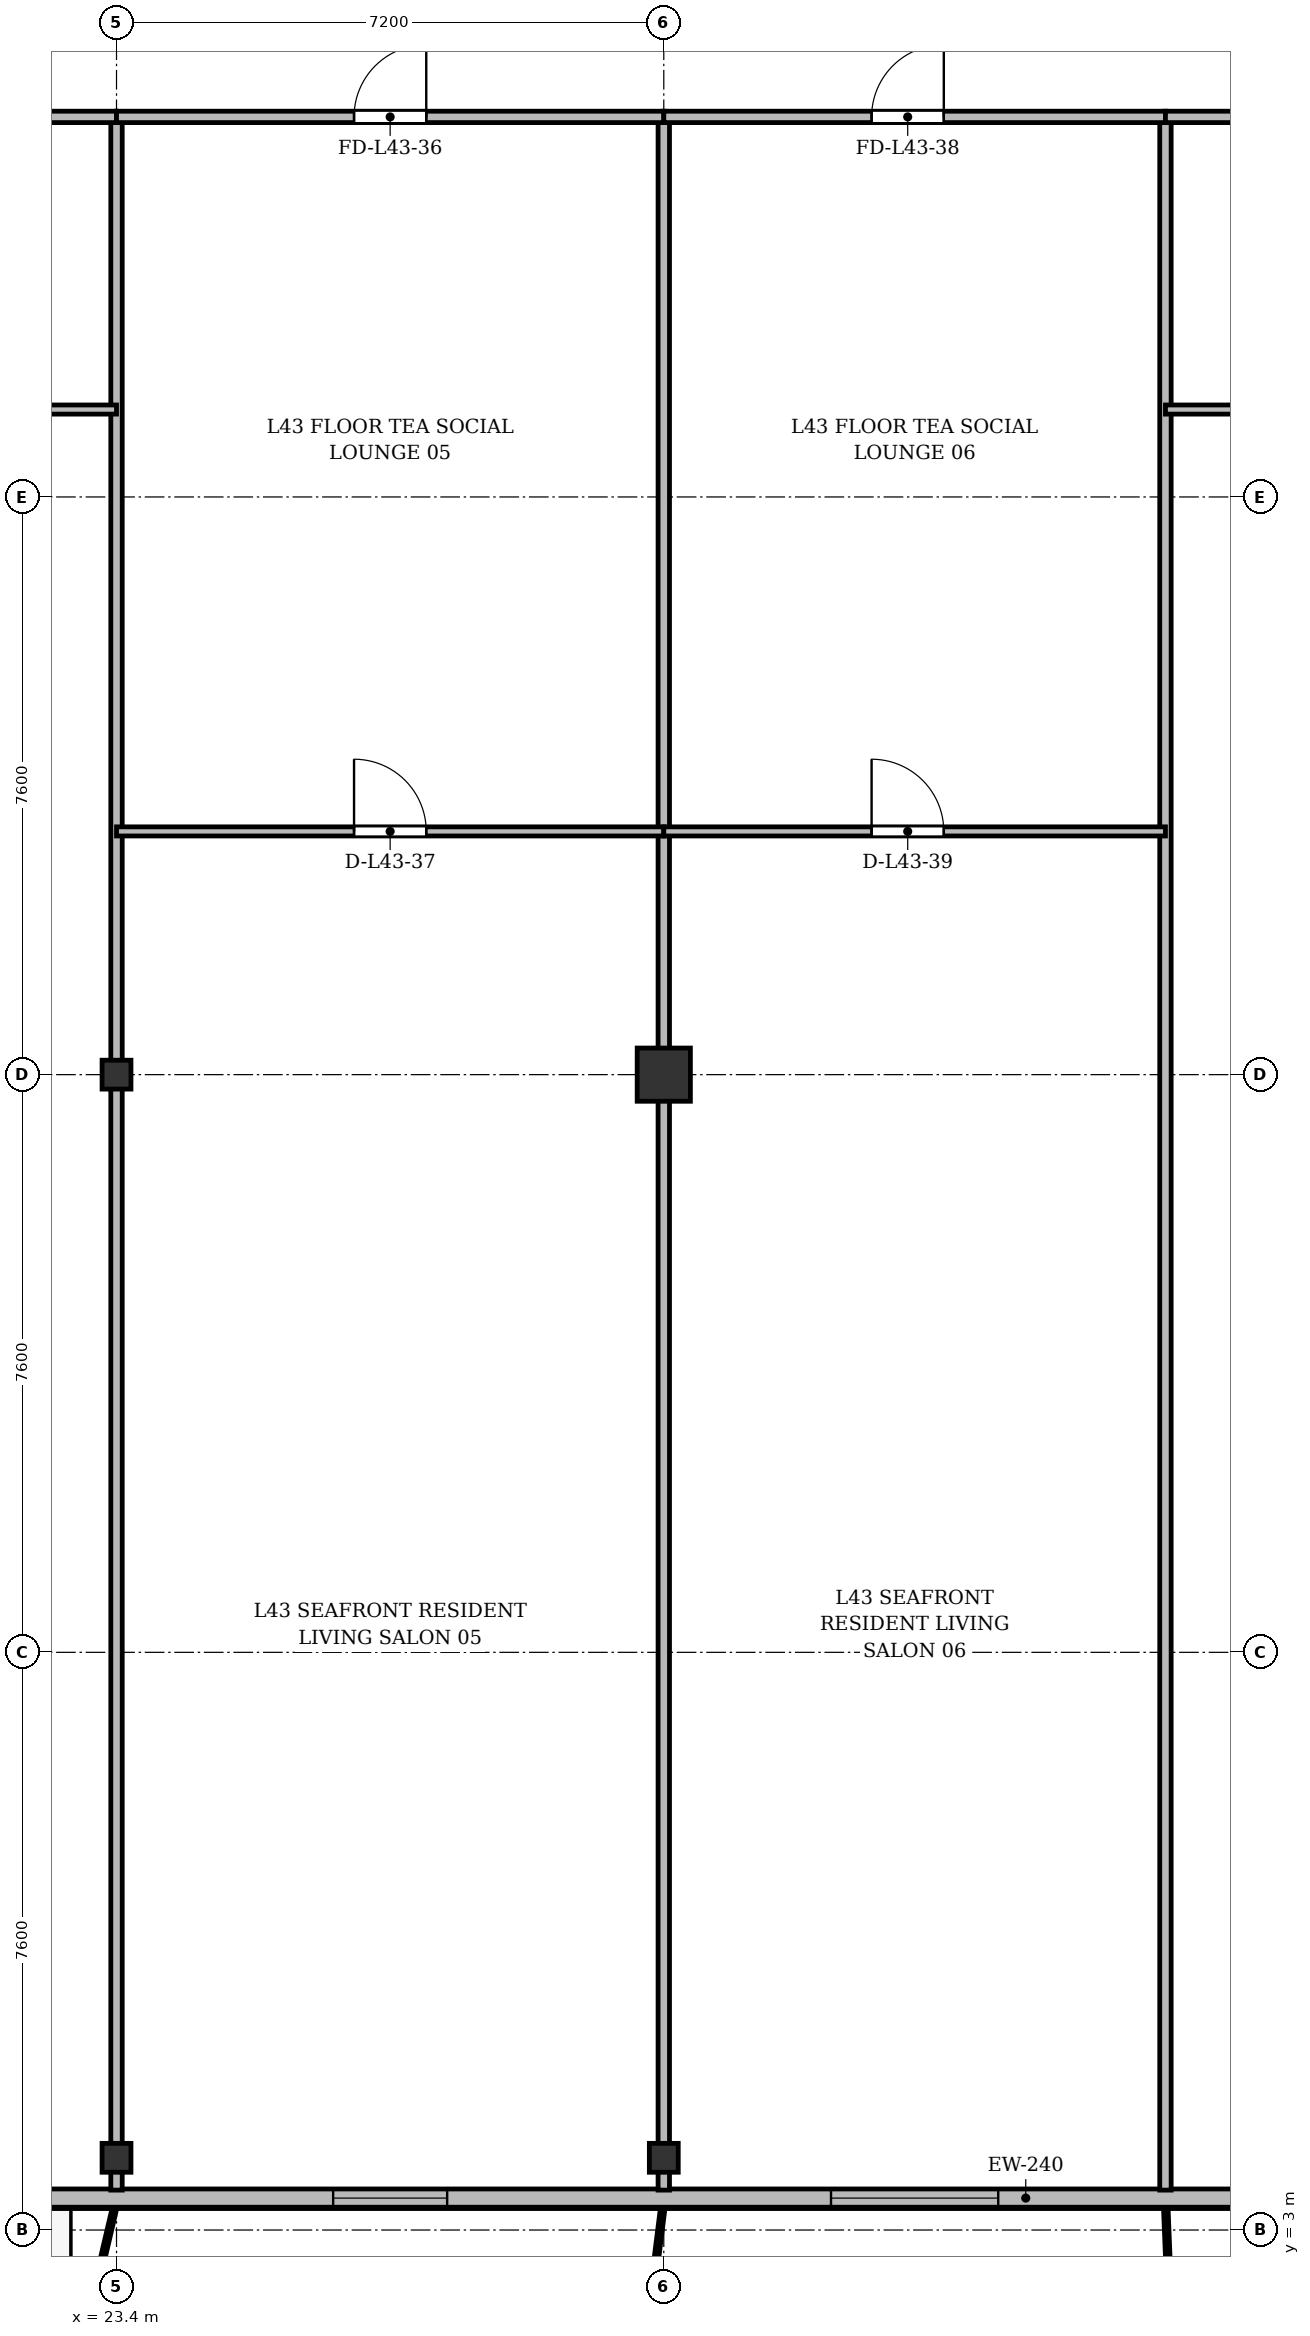
"""IFC4 building model, lengths in metres.
Left out: names, types, materials, properties, quantities, classifications, styles, units other than length and angle.
Written with IfcOpenShell. Run it as: python <this file> out.ifc"""

import sys

from ifc_helpers import new_model, si_unit, direction, frame, frame_2d, origin, origin_2d, place, context, subcontext, project, spatial, rectangle, i_section, extrude, source, transform, mapped, element, fill, save


model = new_model("IFC4")
c1 = context("Model", 3, precision=1e-05, world=origin(), true_north=direction((0.0, 1.0)))
c2 = subcontext(c1, "Body", "Model", "MODEL_VIEW")
j1 = project(units=[si_unit("LENGTHUNIT", "METRE"), si_unit("PLANEANGLEUNIT", "RADIAN")], contexts=[c1])
p1 = place(None, origin())
s1 = spatial("IfcSite", under=j1, at=p1, CompositionType="ELEMENT")
p2 = place(p1, origin())
s2 = spatial("IfcBuilding", under=s1, at=p2, CompositionType="ELEMENT")
p3 = place(p2, frame((0.0, 0.0, 164.5)))
s3 = spatial("IfcBuildingStorey", under=s2, at=p3, CompositionType="ELEMENT", Elevation=164.5)
m1 = source(origin(), c2, "Body", "SweptSolid", [
    extrude(i_section(OverallWidth=0.38, OverallDepth=0.38, WebThickness=0.02, FlangeThickness=0.03, at=origin_2d()), origin(), (0.0, 0.0, 1.0), 3.6),
])
for number, where, z_axis, x_axis in (
    (1, (23.4, 3.95, 0.0), (0.0, 0.0, 1.0), (1.0, 0.0, 0.0)),
    (2, (23.4, 18.2, 0.0), (0.0, 0.0, 1.0), (1.0, 0.0, 0.0)),
    (3, (30.6, 3.95, 0.0), (0.0, 0.0, 1.0), (1.0, 0.0, 0.0)),
):
    element("IfcColumn", number, at=place(p3, frame(where, z_axis=z_axis, x_axis=x_axis)), inside=s3, PredefinedType="COLUMN", context=c2, shape_type="MappedRepresentation", body=[
        mapped(m1, transform((0.0, 0.0, 0.0), x_axis=(1.0, 0.0, 0.0), y_axis=(0.0, 1.0, 0.0), z_axis=(0.0, 0.0, 1.0), scale=1.0)),
    ])
m2 = source(origin(), c2, "Body", "SweptSolid", [
    extrude(rectangle(XDim=0.7, YDim=0.7, at=origin_2d()), origin(), (0.0, 0.0, 1.0), 3.6),
])
p4 = place(p3, frame((30.6, 18.2, 0.0), z_axis=(0.0, 0.0, 1.0), x_axis=(1.0, 0.0, 0.0)))
e4 = element("IfcColumn", 4, at=p4, inside=s3, PredefinedType="COLUMN", context=c2, shape_type="MappedRepresentation", body=[
    mapped(m2, transform((0.0, 0.0, 0.0), x_axis=(1.0, 0.0, 0.0), y_axis=(0.0, 1.0, 0.0), z_axis=(0.0, 0.0, 1.0), scale=1.0)),
])
p5 = place(p3, frame((63.6, 3.42, 0.0), z_axis=(0.0, 0.0, 1.0), x_axis=(-1.0, 0.0, 0.0)))
e5 = element("IfcWall", 5, at=p5, inside=s3, PredefinedType="SOLIDWALL", context=c2, shape_type="SweptSolid", body=[
    extrude(rectangle(XDim=52.8, YDim=0.24, at=frame_2d((26.4, 0.0))), origin(), (0.0, 0.0, 1.0), 3.35),
])
p6 = place(p5, frame((1.445, 0.0, 0.9)))
e6 = element("IfcOpeningElement", 6, at=p6, cuts=e5, PredefinedType="OPENING", context=c2, shape_type="SweptSolid", body=[
    extrude(rectangle(XDim=2.0, YDim=1.95, at=frame_2d((1.0, 0.975))), frame((0.0, 0.13, 0.0), z_axis=(0.0, -1.0, 0.0), x_axis=(1.0, 0.0, 0.0)), (0.0, 0.0, 1.0), 0.26),
])
p7 = place(p5, frame((5.275, 0.0, 0.9)))
e7 = element("IfcOpeningElement", 7, at=p7, cuts=e5, PredefinedType="OPENING", context=c2, shape_type="SweptSolid", body=[
    extrude(rectangle(XDim=1.65, YDim=1.85, at=frame_2d((0.825, 0.925))), frame((0.0, 0.13, 0.0), z_axis=(0.0, -1.0, 0.0), x_axis=(1.0, 0.0, 0.0)), (0.0, 0.0, 1.0), 0.26),
])
p8 = place(p5, frame((7.65, 0.0, 0.9)))
e8 = element("IfcOpeningElement", 8, at=p8, cuts=e5, PredefinedType="OPENING", context=c2, shape_type="SweptSolid", body=[
    extrude(rectangle(XDim=1.5, YDim=1.75, at=frame_2d((0.75, 0.875))), frame((0.0, 0.13, 0.0), z_axis=(0.0, -1.0, 0.0), x_axis=(1.0, 0.0, 0.0)), (0.0, 0.0, 1.0), 0.26),
])
p9 = place(p5, frame((9.9, 0.0, 0.9)))
e9 = element("IfcOpeningElement", 9, at=p9, cuts=e5, PredefinedType="OPENING", context=c2, shape_type="SweptSolid", body=[
    extrude(rectangle(XDim=2.2, YDim=1.8, at=frame_2d((1.1, 0.9))), frame((0.0, 0.13, 0.0), z_axis=(0.0, -1.0, 0.0), x_axis=(1.0, 0.0, 0.0)), (0.0, 0.0, 1.0), 0.26),
])
p10 = place(p5, frame((13.62, 0.0, 0.0)))
e10 = element("IfcOpeningElement", 10, at=p10, cuts=e5, PredefinedType="OPENING", context=c2, shape_type="SweptSolid", body=[
    extrude(rectangle(XDim=1.2, YDim=2.2, at=frame_2d((0.6, 1.1))), frame((0.0, 0.13, 0.0), z_axis=(0.0, -1.0, 0.0), x_axis=(1.0, 0.0, 0.0)), (0.0, 0.0, 1.0), 0.26),
])
p11 = place(p5, frame((15.45, 0.0, 0.9)))
e11 = element("IfcOpeningElement", 11, at=p11, cuts=e5, PredefinedType="OPENING", context=c2, shape_type="SweptSolid", body=[
    extrude(rectangle(XDim=1.5, YDim=1.75, at=frame_2d((0.75, 0.875))), frame((0.0, 0.13, 0.0), z_axis=(0.0, -1.0, 0.0), x_axis=(1.0, 0.0, 0.0)), (0.0, 0.0, 1.0), 0.26),
])
p12 = place(p5, frame((17.775, 0.0, 0.9)))
e12 = element("IfcOpeningElement", 12, at=p12, cuts=e5, PredefinedType="OPENING", context=c2, shape_type="SweptSolid", body=[
    extrude(rectangle(XDim=1.65, YDim=1.85, at=frame_2d((0.825, 0.925))), frame((0.0, 0.13, 0.0), z_axis=(0.0, -1.0, 0.0), x_axis=(1.0, 0.0, 0.0)), (0.0, 0.0, 1.0), 0.26),
])
p13 = place(p5, frame((22.2, 0.0, 0.9)))
e13 = element("IfcOpeningElement", 13, at=p13, cuts=e5, PredefinedType="OPENING", context=c2, shape_type="SweptSolid", body=[
    extrude(rectangle(XDim=1.8, YDim=1.8, at=frame_2d((0.9, 0.9))), frame((0.0, 0.13, 0.0), z_axis=(0.0, -1.0, 0.0), x_axis=(1.0, 0.0, 0.0)), (0.0, 0.0, 1.0), 0.26),
])
p14 = place(p5, frame((28.6, 0.0, 0.9)))
e14 = element("IfcOpeningElement", 14, at=p14, cuts=e5, PredefinedType="OPENING", context=c2, shape_type="SweptSolid", body=[
    extrude(rectangle(XDim=2.2, YDim=1.8, at=frame_2d((1.1, 0.9))), frame((0.0, 0.13, 0.0), z_axis=(0.0, -1.0, 0.0), x_axis=(1.0, 0.0, 0.0)), (0.0, 0.0, 1.0), 0.26),
])
p15 = place(p5, frame((35.85, 0.0, 0.9)))
e15 = element("IfcOpeningElement", 15, at=p15, cuts=e5, PredefinedType="OPENING", context=c2, shape_type="SweptSolid", body=[
    extrude(rectangle(XDim=1.5, YDim=1.75, at=frame_2d((0.75, 0.875))), frame((0.0, 0.13, 0.0), z_axis=(0.0, -1.0, 0.0), x_axis=(1.0, 0.0, 0.0)), (0.0, 0.0, 1.0), 0.26),
])
p16 = place(p5, frame((41.656, 0.0, 0.0)))
e16 = element("IfcOpeningElement", 16, at=p16, cuts=e5, PredefinedType="OPENING", context=c2, shape_type="SweptSolid", body=[
    extrude(rectangle(XDim=1.2, YDim=2.2, at=frame_2d((0.6, 1.1))), frame((0.0, 0.13, 0.0), z_axis=(0.0, -1.0, 0.0), x_axis=(1.0, 0.0, 0.0)), (0.0, 0.0, 1.0), 0.26),
])
p17 = place(p5, frame((43.65, 0.0, 0.9)))
e17 = element("IfcOpeningElement", 17, at=p17, cuts=e5, PredefinedType="OPENING", context=c2, shape_type="SweptSolid", body=[
    extrude(rectangle(XDim=1.5, YDim=1.75, at=frame_2d((0.75, 0.875))), frame((0.0, 0.13, 0.0), z_axis=(0.0, -1.0, 0.0), x_axis=(1.0, 0.0, 0.0)), (0.0, 0.0, 1.0), 0.26),
])
p18 = place(p5, frame((45.8, 0.0, 0.9)))
e18 = element("IfcOpeningElement", 18, at=p18, cuts=e5, PredefinedType="OPENING", context=c2, shape_type="SweptSolid", body=[
    extrude(rectangle(XDim=1.8, YDim=1.8, at=frame_2d((0.9, 0.9))), frame((0.0, 0.13, 0.0), z_axis=(0.0, -1.0, 0.0), x_axis=(1.0, 0.0, 0.0)), (0.0, 0.0, 1.0), 0.26),
])
p19 = place(p5, frame((49.255, 0.0, 0.9)))
e19 = element("IfcOpeningElement", 19, at=p19, cuts=e5, PredefinedType="OPENING", context=c2, shape_type="SweptSolid", body=[
    extrude(rectangle(XDim=2.2, YDim=1.8, at=frame_2d((1.1, 0.9))), frame((0.0, 0.13, 0.0), z_axis=(0.0, -1.0, 0.0), x_axis=(1.0, 0.0, 0.0)), (0.0, 0.0, 1.0), 0.26),
])
for number, where, z_axis, x_axis in (
    (20, (23.4, 3.525, 0.0), (0.0, 0.0, 1.0), (0.0, 1.0, 0.0)),
    (21, (30.6, 3.525, 0.0), (0.0, 0.0, 1.0), (0.0, 1.0, 0.0)),
):
    element("IfcWall", number, at=place(p3, frame(where, z_axis=z_axis, x_axis=x_axis)), inside=s3, PredefinedType="PARTITIONING", context=c2, shape_type="SweptSolid", body=[
        extrude(rectangle(XDim=27.275, YDim=0.15, at=frame_2d((13.638, 0.0))), origin(), (0.0, 0.0, 1.0), 2.85),
    ])
p20 = place(p3, frame((37.2, 3.525, 0.0), z_axis=(0.0, 0.0, 1.0), x_axis=(0.0, 1.0, 0.0)))
e22 = element("IfcWall", 22, at=p20, inside=s3, PredefinedType="PARTITIONING", context=c2, shape_type="SweptSolid", body=[
    extrude(rectangle(XDim=27.275, YDim=0.15, at=frame_2d((13.638, 0.0))), origin(), (0.0, 0.0, 1.0), 2.75),
])
p21 = place(p3, frame((20.2, 30.8, 0.0), z_axis=(0.0, 0.0, 1.0), x_axis=(1.0, 0.0, 0.0)))
e23 = element("IfcWall", 23, at=p21, inside=s3, PredefinedType="PARTITIONING", context=c2, shape_type="SweptSolid", body=[
    extrude(rectangle(XDim=3.2, YDim=0.15, at=frame_2d((1.6, 0.0))), origin(), (0.0, 0.0, 1.0), 2.85),
])
p22 = place(p21, frame((1.125, 0.0, 0.0)))
e24 = element("IfcOpeningElement", 24, at=p22, cuts=e23, PredefinedType="OPENING", context=c2, shape_type="SweptSolid", body=[
    extrude(rectangle(XDim=0.95, YDim=2.15, at=frame_2d((0.475, 1.075))), frame((0.0, 0.085, 0.0), z_axis=(0.0, -1.0, 0.0), x_axis=(1.0, 0.0, 0.0)), (0.0, 0.0, 1.0), 0.17),
])
p23 = place(p3, frame((20.2, 26.95, 0.0), z_axis=(0.0, 0.0, 1.0), x_axis=(1.0, 0.0, 0.0)))
e25 = element("IfcWall", 25, at=p23, inside=s3, PredefinedType="PARTITIONING", context=c2, shape_type="SweptSolid", body=[
    extrude(rectangle(XDim=3.2, YDim=0.12, at=frame_2d((1.6, 0.0))), origin(), (0.0, 0.0, 1.0), 2.85),
])
p24 = place(p23, frame((1.125, 0.0, 0.0)))
e26 = element("IfcOpeningElement", 26, at=p24, cuts=e25, PredefinedType="OPENING", context=c2, shape_type="SweptSolid", body=[
    extrude(rectangle(XDim=0.95, YDim=2.15, at=frame_2d((0.475, 1.075))), frame((0.0, 0.07, 0.0), z_axis=(0.0, -1.0, 0.0), x_axis=(1.0, 0.0, 0.0)), (0.0, 0.0, 1.0), 0.14),
])
p25 = place(p3, frame((23.4, 30.8, 0.0), z_axis=(0.0, 0.0, 1.0), x_axis=(1.0, 0.0, 0.0)))
e27 = element("IfcWall", 27, at=p25, inside=s3, PredefinedType="PARTITIONING", context=c2, shape_type="SweptSolid", body=[
    extrude(rectangle(XDim=7.2, YDim=0.15, at=frame_2d((3.6, 0.0))), origin(), (0.0, 0.0, 1.0), 2.85),
])
p26 = place(p25, frame((3.125, 0.0, 0.0)))
e28 = element("IfcOpeningElement", 28, at=p26, cuts=e27, PredefinedType="OPENING", context=c2, shape_type="SweptSolid", body=[
    extrude(rectangle(XDim=0.95, YDim=2.15, at=frame_2d((0.475, 1.075))), frame((0.0, 0.085, 0.0), z_axis=(0.0, -1.0, 0.0), x_axis=(1.0, 0.0, 0.0)), (0.0, 0.0, 1.0), 0.17),
])
p27 = place(p3, frame((23.4, 21.4, 0.0), z_axis=(0.0, 0.0, 1.0), x_axis=(1.0, 0.0, 0.0)))
e29 = element("IfcWall", 29, at=p27, inside=s3, PredefinedType="PARTITIONING", context=c2, shape_type="SweptSolid", body=[
    extrude(rectangle(XDim=7.2, YDim=0.12, at=frame_2d((3.6, 0.0))), origin(), (0.0, 0.0, 1.0), 2.85),
])
p28 = place(p27, frame((3.125, 0.0, 0.0)))
e30 = element("IfcOpeningElement", 30, at=p28, cuts=e29, PredefinedType="OPENING", context=c2, shape_type="SweptSolid", body=[
    extrude(rectangle(XDim=0.95, YDim=2.15, at=frame_2d((0.475, 1.075))), frame((0.0, 0.07, 0.0), z_axis=(0.0, -1.0, 0.0), x_axis=(1.0, 0.0, 0.0)), (0.0, 0.0, 1.0), 0.14),
])
p29 = place(p3, frame((30.6, 30.8, 0.0), z_axis=(0.0, 0.0, 1.0), x_axis=(1.0, 0.0, 0.0)))
e31 = element("IfcWall", 31, at=p29, inside=s3, PredefinedType="PARTITIONING", context=c2, shape_type="SweptSolid", body=[
    extrude(rectangle(XDim=6.6, YDim=0.15, at=frame_2d((3.3, 0.0))), origin(), (0.0, 0.0, 1.0), 2.85),
])
p30 = place(p29, frame((2.734, 0.0, 0.0)))
e32 = element("IfcOpeningElement", 32, at=p30, cuts=e31, PredefinedType="OPENING", context=c2, shape_type="SweptSolid", body=[
    extrude(rectangle(XDim=0.95, YDim=2.15, at=frame_2d((0.475, 1.075))), frame((0.0, 0.085, 0.0), z_axis=(0.0, -1.0, 0.0), x_axis=(1.0, 0.0, 0.0)), (0.0, 0.0, 1.0), 0.17),
])
p31 = place(p3, frame((30.6, 21.4, 0.0), z_axis=(0.0, 0.0, 1.0), x_axis=(1.0, 0.0, 0.0)))
e33 = element("IfcWall", 33, at=p31, inside=s3, PredefinedType="PARTITIONING", context=c2, shape_type="SweptSolid", body=[
    extrude(rectangle(XDim=6.6, YDim=0.12, at=frame_2d((3.3, 0.0))), origin(), (0.0, 0.0, 1.0), 2.85),
])
p32 = place(p31, frame((2.734, 0.0, 0.0)))
e34 = element("IfcOpeningElement", 34, at=p32, cuts=e33, PredefinedType="OPENING", context=c2, shape_type="SweptSolid", body=[
    extrude(rectangle(XDim=0.95, YDim=2.15, at=frame_2d((0.475, 1.075))), frame((0.0, 0.07, 0.0), z_axis=(0.0, -1.0, 0.0), x_axis=(1.0, 0.0, 0.0)), (0.0, 0.0, 1.0), 0.14),
])
p33 = place(p3, frame((37.2, 30.8, 0.0), z_axis=(0.0, 0.0, 1.0), x_axis=(1.0, 0.0, 0.0)))
e35 = element("IfcWall", 35, at=p33, inside=s3, PredefinedType="PARTITIONING", context=c2, shape_type="SweptSolid", body=[
    extrude(rectangle(XDim=6.6, YDim=0.15, at=frame_2d((3.3, 0.0))), origin(), (0.0, 0.0, 1.0), 2.85),
])
p34 = place(p33, frame((2.734, 0.0, 0.0)))
e36 = element("IfcOpeningElement", 36, at=p34, cuts=e35, PredefinedType="OPENING", context=c2, shape_type="SweptSolid", body=[
    extrude(rectangle(XDim=0.95, YDim=2.15, at=frame_2d((0.475, 1.075))), frame((0.0, 0.085, 0.0), z_axis=(0.0, -1.0, 0.0), x_axis=(1.0, 0.0, 0.0)), (0.0, 0.0, 1.0), 0.17),
])
p35 = place(p3, frame((37.2, 26.95, 0.0), z_axis=(0.0, 0.0, 1.0), x_axis=(1.0, 0.0, 0.0)))
e37 = element("IfcWall", 37, at=p35, inside=s3, PredefinedType="PARTITIONING", context=c2, shape_type="SweptSolid", body=[
    extrude(rectangle(XDim=6.6, YDim=0.12, at=frame_2d((3.3, 0.0))), origin(), (0.0, 0.0, 1.0), 2.85),
])
p36 = place(p35, frame((2.734, 0.0, 0.0)))
e38 = element("IfcOpeningElement", 38, at=p36, cuts=e37, PredefinedType="OPENING", context=c2, shape_type="SweptSolid", body=[
    extrude(rectangle(XDim=0.95, YDim=2.15, at=frame_2d((0.475, 1.075))), frame((0.0, 0.07, 0.0), z_axis=(0.0, -1.0, 0.0), x_axis=(1.0, 0.0, 0.0)), (0.0, 0.0, 1.0), 0.14),
])
m3 = source(origin(), c2, "Body", "SweptSolid", [
    extrude(rectangle(XDim=2.2, YDim=1.8, at=frame_2d((1.1, 0.9))), frame((0.0, 0.03, 0.0), z_axis=(0.0, -1.0, 0.0), x_axis=(1.0, 0.0, 0.0)), (0.0, 0.0, 1.0), 0.06),
])
p37 = place(p14, origin())
e39 = element("IfcWindow", 39, at=p37, inside=s3, PartitioningType="SINGLE_PANEL", PredefinedType="WINDOW", context=c2, shape_type="MappedRepresentation", body=[
    mapped(m3, transform((0.0, 0.0, 0.0), x_axis=(1.0, 0.0, 0.0), y_axis=(0.0, 1.0, 0.0), z_axis=(0.0, 0.0, 1.0), scale=1.0)),
])
fill(e14, e39)
m4 = source(origin(), c2, "Body", "SweptSolid", [
    extrude(rectangle(XDim=1.5, YDim=1.75, at=frame_2d((0.75, 0.875))), frame((0.0, 0.03, 0.0), z_axis=(0.0, -1.0, 0.0), x_axis=(1.0, 0.0, 0.0)), (0.0, 0.0, 1.0), 0.06),
])
p38 = place(p15, origin())
e40 = element("IfcWindow", 40, at=p38, inside=s3, PartitioningType="SINGLE_PANEL", PredefinedType="WINDOW", context=c2, shape_type="MappedRepresentation", body=[
    mapped(m4, transform((0.0, 0.0, 0.0), x_axis=(1.0, 0.0, 0.0), y_axis=(0.0, 1.0, 0.0), z_axis=(0.0, 0.0, 1.0), scale=1.0)),
])
fill(e15, e40)
m5 = source(origin(), c2, "Body", "SweptSolid", [
    extrude(rectangle(XDim=0.95, YDim=2.15, at=frame_2d((0.475, 1.075))), frame((0.0, 0.025, 0.0), z_axis=(0.0, -1.0, 0.0), x_axis=(1.0, 0.0, 0.0)), (0.0, 0.0, 1.0), 0.05),
])
p39 = place(p26, origin())
e41 = element("IfcDoor", 41, at=p39, inside=s3, OperationType="SINGLE_SWING_RIGHT", PredefinedType="DOOR", context=c2, shape_type="MappedRepresentation", body=[
    mapped(m5, transform((0.0, 0.0, 0.0), x_axis=(1.0, 0.0, 0.0), y_axis=(0.0, 1.0, 0.0), z_axis=(0.0, 0.0, 1.0), scale=1.0)),
])
fill(e28, e41)
p40 = place(p28, origin())
e42 = element("IfcDoor", 42, at=p40, inside=s3, OperationType="SINGLE_SWING_LEFT", PredefinedType="DOOR", context=c2, shape_type="MappedRepresentation", body=[
    mapped(m5, transform((0.0, 0.0, 0.0), x_axis=(1.0, 0.0, 0.0), y_axis=(0.0, 1.0, 0.0), z_axis=(0.0, 0.0, 1.0), scale=1.0)),
])
fill(e30, e42)
p41 = place(p30, origin())
e43 = element("IfcDoor", 43, at=p41, inside=s3, OperationType="SINGLE_SWING_RIGHT", PredefinedType="DOOR", context=c2, shape_type="MappedRepresentation", body=[
    mapped(m5, transform((0.0, 0.0, 0.0), x_axis=(1.0, 0.0, 0.0), y_axis=(0.0, 1.0, 0.0), z_axis=(0.0, 0.0, 1.0), scale=1.0)),
])
fill(e32, e43)
p42 = place(p32, origin())
e44 = element("IfcDoor", 44, at=p42, inside=s3, OperationType="SINGLE_SWING_LEFT", PredefinedType="DOOR", context=c2, shape_type="MappedRepresentation", body=[
    mapped(m5, transform((0.0, 0.0, 0.0), x_axis=(1.0, 0.0, 0.0), y_axis=(0.0, 1.0, 0.0), z_axis=(0.0, 0.0, 1.0), scale=1.0)),
])
fill(e34, e44)
save(model, sys.argv[1])
